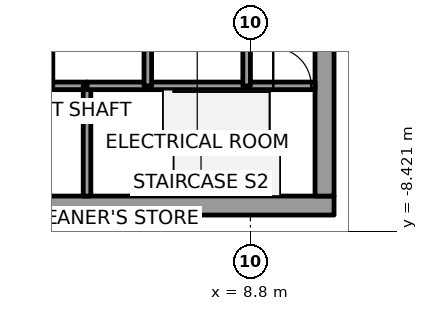
"""IFC4 building model, lengths in metres.
Left out: names, types, materials, properties, quantities, classifications, styles, units other than length and angle.
Written with IfcOpenShell. Run it as: python <this file> out.ifc"""

import sys

from ifc_helpers import new_model, si_unit, direction, frame, frame_2d, origin, place, context, subcontext, project, spatial, rectangle, extrude, element, fill, save


model = new_model("IFC4")
c1 = context("Model", 3, precision=1e-05, world=origin(), true_north=direction((0.0, 1.0)))
c2 = subcontext(c1, "Body", "Model", "MODEL_VIEW")
j1 = project(units=[si_unit("LENGTHUNIT", "METRE"), si_unit("PLANEANGLEUNIT", "RADIAN")], contexts=[c1])
p1 = place(None, origin())
s1 = spatial("IfcSite", under=j1, at=p1, CompositionType="ELEMENT")
p2 = place(p1, origin())
s2 = spatial("IfcBuilding", under=s1, at=p2, CompositionType="ELEMENT")
p3 = place(p2, frame((0.0, 0.0, 22.2)))
s3 = spatial("IfcBuildingStorey", under=s2, at=p3, CompositionType="ELEMENT", Elevation=22.2)
p4 = place(p3, frame((-11.0, -7.75, 0.0), z_axis=(0.0, 0.0, 1.0), x_axis=(1.0, 0.0, 0.0)))
e1 = element("IfcWall", 1, at=p4, inside=s3, PredefinedType="SHEAR", context=c2, shape_type="SweptSolid", body=[
    extrude(rectangle(XDim=22.0, YDim=0.5, at=frame_2d((11.0, 0.0))), origin(), (0.0, 0.0, 1.0), 6.6),
])
p5 = place(p4, frame((10.45, 0.0, 0.0)))
e2 = element("IfcOpeningElement", 2, at=p5, cuts=e1, PredefinedType="OPENING", context=c2, shape_type="SweptSolid", body=[
    extrude(rectangle(XDim=1.1, YDim=2.1, at=frame_2d((0.55, 1.05))), frame((0.0, 0.25, 0.0), z_axis=(0.0, -1.0, 0.0), x_axis=(1.0, 0.0, 0.0)), (0.0, 0.0, 1.0), 0.5),
])
p6 = place(p3, frame((10.75, -7.5, 0.0), z_axis=(0.0, 0.0, 1.0), x_axis=(0.0, 1.0, 0.0)))
e3 = element("IfcWall", 3, at=p6, inside=s3, PredefinedType="SHEAR", context=c2, shape_type="SweptSolid", body=[
    extrude(rectangle(XDim=15.0, YDim=0.5, at=frame_2d((7.5, 0.0))), origin(), (0.0, 0.0, 1.0), 6.6),
])
p7 = place(p6, frame((6.6, 0.0, 0.0)))
e4 = element("IfcOpeningElement", 4, at=p7, cuts=e3, PredefinedType="OPENING", context=c2, shape_type="SweptSolid", body=[
    extrude(rectangle(XDim=1.8, YDim=2.1, at=frame_2d((0.9, 1.05))), frame((0.0, 0.25, 0.0), z_axis=(0.0, -1.0, 0.0), x_axis=(1.0, 0.0, 0.0)), (0.0, 0.0, 1.0), 0.5),
])
p8 = place(p3, frame((3.5, -4.6, 0.0), z_axis=(0.0, 0.0, 1.0), x_axis=(1.0, 0.0, 0.0)))
e5 = element("IfcWall", 5, at=p8, inside=s3, PredefinedType="SOLIDWALL", context=c2, shape_type="SweptSolid", body=[
    extrude(rectangle(XDim=1.0, YDim=0.2, at=frame_2d((0.5, 0.0))), origin(), (0.0, 0.0, 1.0), 6.35),
])
p9 = place(p3, frame((4.5, -7.5, 0.0), z_axis=(0.0, 0.0, 1.0), x_axis=(0.0, 1.0, 0.0)))
e6 = element("IfcWall", 6, at=p9, inside=s3, PredefinedType="SOLIDWALL", context=c2, shape_type="SweptSolid", body=[
    extrude(rectangle(XDim=2.9, YDim=0.2, at=frame_2d((1.45, 0.0))), origin(), (0.0, 0.0, 1.0), 6.35),
])
p10 = place(p3, frame((4.5, -4.6, 0.0), z_axis=(0.0, 0.0, 1.0), x_axis=(1.0, 0.0, 0.0)))
e7 = element("IfcWall", 7, at=p10, inside=s3, PredefinedType="SOLIDWALL", context=c2, shape_type="SweptSolid", body=[
    extrude(rectangle(XDim=1.6, YDim=0.2, at=frame_2d((0.8, 0.0))), origin(), (0.0, 0.0, 1.0), 6.35),
])
p11 = place(p3, frame((6.1, -4.6, 0.0), z_axis=(0.0, 0.0, 1.0), x_axis=(1.0, 0.0, 0.0)))
e8 = element("IfcWall", 8, at=p11, inside=s3, PredefinedType="SOLIDWALL", context=c2, shape_type="SweptSolid", body=[
    extrude(rectangle(XDim=2.6, YDim=0.2, at=frame_2d((1.3, 0.0))), origin(), (0.0, 0.0, 1.0), 6.35),
])
p12 = place(p3, frame((6.1, -4.6, 0.0), z_axis=(0.0, 0.0, 1.0), x_axis=(0.0, 1.0, 0.0)))
e9 = element("IfcWall", 9, at=p12, inside=s3, PredefinedType="SOLIDWALL", context=c2, shape_type="SweptSolid", body=[
    extrude(rectangle(XDim=2.8, YDim=0.2, at=frame_2d((1.4, 0.0))), origin(), (0.0, 0.0, 1.0), 6.35),
])
p13 = place(p3, frame((8.7, -4.6, 0.0), z_axis=(0.0, 0.0, 1.0), x_axis=(1.0, 0.0, 0.0)))
e10 = element("IfcWall", 10, at=p13, inside=s3, PredefinedType="SOLIDWALL", context=c2, shape_type="SweptSolid", body=[
    extrude(rectangle(XDim=1.8, YDim=0.2, at=frame_2d((0.9, 0.0))), origin(), (0.0, 0.0, 1.0), 6.35),
])
p14 = place(p13, frame((0.7, 0.0, 0.0)))
e11 = element("IfcOpeningElement", 11, at=p14, cuts=e10, PredefinedType="OPENING", context=c2, shape_type="SweptSolid", body=[
    extrude(rectangle(XDim=1.0, YDim=2.1, at=frame_2d((0.5, 1.05))), frame((0.0, 0.1, 0.0), z_axis=(0.0, -1.0, 0.0), x_axis=(1.0, 0.0, 0.0)), (0.0, 0.0, 1.0), 0.2),
])
p15 = place(p3, frame((8.7, -4.6, 0.0), z_axis=(0.0, 0.0, 1.0), x_axis=(0.0, 1.0, 0.0)))
e12 = element("IfcWall", 12, at=p15, inside=s3, PredefinedType="SOLIDWALL", context=c2, shape_type="SweptSolid", body=[
    extrude(rectangle(XDim=2.8, YDim=0.2, at=frame_2d((1.4, 0.0))), origin(), (0.0, 0.0, 1.0), 6.35),
])
p16 = place(p14, origin())
e13 = element("IfcDoor", 13, at=p16, inside=s3, OperationType="SINGLE_SWING_RIGHT", PredefinedType="DOOR", context=c2, shape_type="SweptSolid", body=[
    extrude(rectangle(XDim=1.0, YDim=2.1, at=frame_2d((0.5, 1.05))), frame((0.0, 0.025, 0.0), z_axis=(0.0, -1.0, 0.0), x_axis=(1.0, 0.0, 0.0)), (0.0, 0.0, 1.0), 0.05),
])
fill(e11, e13)
save(model, sys.argv[1])
